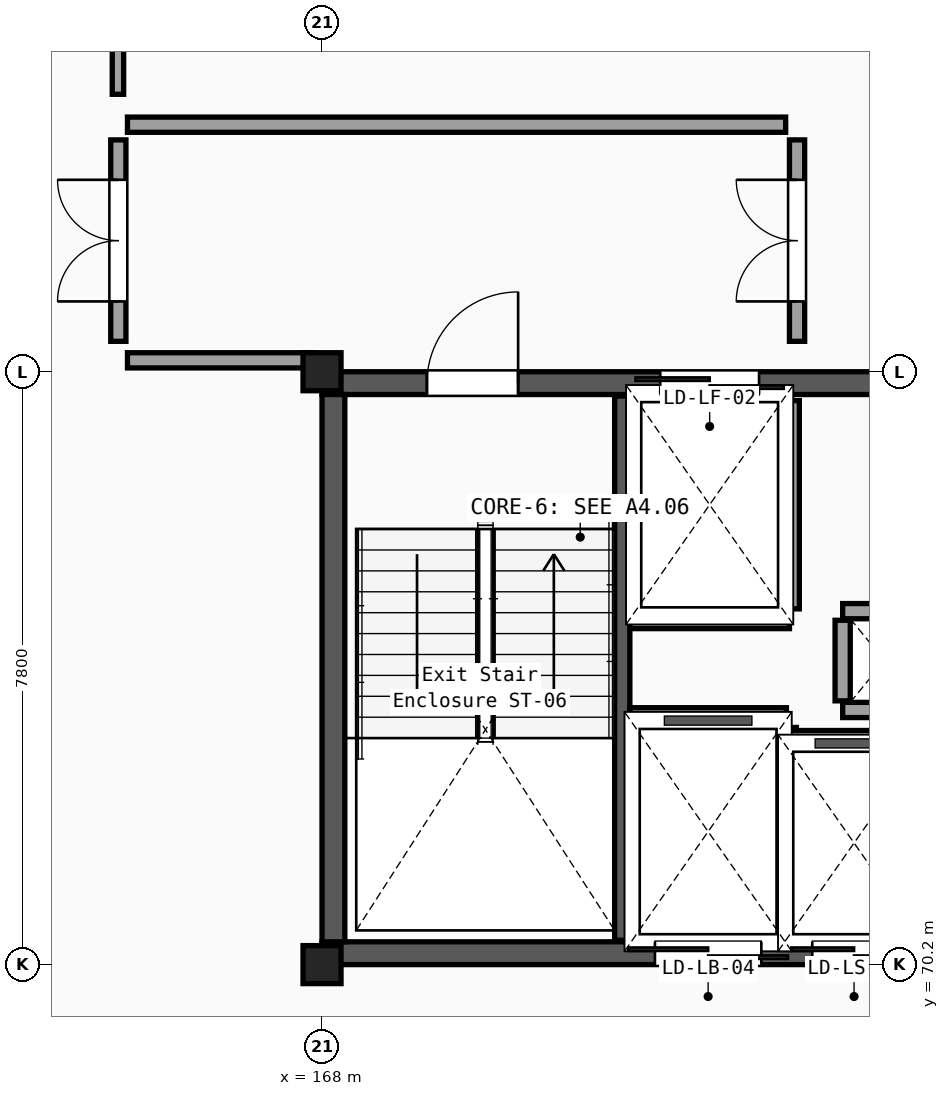
"""IFC4 building model, lengths in metres.
Left out: names, types, materials, properties, quantities, classifications, styles, units other than length and angle.
Written with IfcOpenShell. Run it as: python <this file> out.ifc"""

import sys

from ifc_helpers import new_model, si_unit, direction, frame, frame_2d, origin, origin_2d, place, context, subcontext, project, spatial, rectangle, i_section, extrude, element, fill, save


model = new_model("IFC4")
c1 = context("Model", 3, precision=1e-05, world=origin(), true_north=direction((0.0, 1.0)))
c2 = subcontext(c1, "Body", "Model", "MODEL_VIEW")
j1 = project(units=[si_unit("LENGTHUNIT", "METRE"), si_unit("PLANEANGLEUNIT", "RADIAN")], contexts=[c1])
p1 = place(None, origin())
s1 = spatial("IfcSite", under=j1, at=p1, CompositionType="ELEMENT")
p2 = place(p1, origin())
s2 = spatial("IfcBuilding", under=s1, at=p2, CompositionType="ELEMENT")
p3 = place(p2, frame((0.0, 0.0, 18.9)))
s3 = spatial("IfcBuildingStorey", under=s2, at=p3, CompositionType="ELEMENT", Elevation=18.9)
for number, where, z_axis, x_axis in (
    (1, (168.0, 70.2, 0.0), (0.0, 0.0, 1.0), (1.0, 0.0, 0.0)),
    (2, (168.0, 78.0, 0.0), (0.0, 0.0, 1.0), (1.0, 0.0, 0.0)),
):
    element("IfcColumn", number, at=place(p3, frame(where, z_axis=z_axis, x_axis=x_axis)), inside=s3, PredefinedType="COLUMN", context=c2, shape_type="SweptSolid", body=[
        extrude(i_section(OverallWidth=0.3, OverallDepth=0.5, WebThickness=0.014, FlangeThickness=0.028, FilletRadius=0.027, at=origin_2d()), origin(), (0.0, 0.0, 1.0), 4.05),
    ])
p4 = place(p3, frame((168.0, 70.35, 0.0), z_axis=(0.0, 0.0, 1.0), x_axis=(1.0, 0.0, 0.0)))
e3 = element("IfcWall", 3, at=p4, inside=s3, PredefinedType="SHEAR", context=c2, shape_type="SweptSolid", body=[
    extrude(rectangle(XDim=8.4, YDim=0.3, at=frame_2d((4.2, 0.0))), origin(), (0.0, 0.0, 1.0), 3.82),
])
p5 = place(p4, frame((4.38, 0.0, 0.0)))
e4 = element("IfcOpeningElement", 4, at=p5, cuts=e3, PredefinedType="OPENING", context=c2, shape_type="SweptSolid", body=[
    extrude(rectangle(XDim=1.4, YDim=2.2, at=frame_2d((0.7, 1.1))), frame((0.0, 0.16, 0.0), z_axis=(0.0, -1.0, 0.0), x_axis=(1.0, 0.0, 0.0)), (0.0, 0.0, 1.0), 0.32),
])
p6 = place(p4, frame((6.45, 0.0, 0.0)))
e5 = element("IfcOpeningElement", 5, at=p6, cuts=e3, PredefinedType="OPENING", context=c2, shape_type="SweptSolid", body=[
    extrude(rectangle(XDim=1.1, YDim=2.15, at=frame_2d((0.55, 1.075))), frame((0.0, 0.16, 0.0), z_axis=(0.0, -1.0, 0.0), x_axis=(1.0, 0.0, 0.0)), (0.0, 0.0, 1.0), 0.32),
])
p7 = place(p3, frame((168.0, 77.85, 0.0), z_axis=(0.0, 0.0, 1.0), x_axis=(1.0, 0.0, 0.0)))
e6 = element("IfcWall", 6, at=p7, inside=s3, PredefinedType="SHEAR", context=c2, shape_type="SweptSolid", body=[
    extrude(rectangle(XDim=8.4, YDim=0.3, at=frame_2d((4.2, 0.0))), origin(), (0.0, 0.0, 1.0), 3.82),
])
p8 = place(p7, frame((1.38, 0.0, 0.0)))
e7 = element("IfcOpeningElement", 7, at=p8, cuts=e6, PredefinedType="OPENING", context=c2, shape_type="SweptSolid", body=[
    extrude(rectangle(XDim=1.2, YDim=2.15, at=frame_2d((0.6, 1.075))), frame((0.0, 0.16, 0.0), z_axis=(0.0, -1.0, 0.0), x_axis=(1.0, 0.0, 0.0)), (0.0, 0.0, 1.0), 0.32),
])
p9 = place(p7, frame((4.45, 0.0, 0.0)))
e8 = element("IfcOpeningElement", 8, at=p9, cuts=e6, PredefinedType="OPENING", context=c2, shape_type="SweptSolid", body=[
    extrude(rectangle(XDim=1.3, YDim=2.2, at=frame_2d((0.65, 1.1))), frame((0.0, 0.16, 0.0), z_axis=(0.0, -1.0, 0.0), x_axis=(1.0, 0.0, 0.0)), (0.0, 0.0, 1.0), 0.32),
])
p10 = place(p3, frame((168.15, 70.5, 0.0), z_axis=(0.0, 0.0, 1.0), x_axis=(0.0, 1.0, 0.0)))
e9 = element("IfcWall", 9, at=p10, inside=s3, PredefinedType="SHEAR", context=c2, shape_type="SweptSolid", body=[
    extrude(rectangle(XDim=7.2, YDim=0.3, at=frame_2d((3.6, 0.0))), origin(), (0.0, 0.0, 1.0), 3.82),
])
p11 = place(p3, frame((171.95, 70.52, 0.0), z_axis=(0.0, 0.0, 1.0), x_axis=(0.0, 1.0, 0.0)))
e10 = element("IfcWall", 10, at=p11, inside=s3, PredefinedType="SHEAR", context=c2, shape_type="SweptSolid", body=[
    extrude(rectangle(XDim=7.16, YDim=0.2, at=frame_2d((3.58, 0.0))), origin(), (0.0, 0.0, 1.0), 3.82),
])
for number, where, z_axis, x_axis in (
    (11, (174.85, 73.55, 0.0), (0.0, 0.0, 1.0), (1.0, 0.0, 0.0)),
    (12, (174.85, 74.85, 0.0), (0.0, 0.0, 1.0), (1.0, 0.0, 0.0)),
):
    element("IfcWall", number, at=place(p3, frame(where, z_axis=z_axis, x_axis=x_axis)), inside=s3, PredefinedType="PARTITIONING", context=c2, shape_type="SweptSolid", body=[
        extrude(rectangle(XDim=1.1, YDim=0.2, at=frame_2d((0.55, 0.0))), origin(), (0.0, 0.0, 1.0), 3.25),
    ])
p12 = place(p3, frame((174.85, 73.67, 0.0), z_axis=(0.0, 0.0, 1.0), x_axis=(0.0, 1.0, 0.0)))
e13 = element("IfcWall", 13, at=p12, inside=s3, PredefinedType="PARTITIONING", context=c2, shape_type="SweptSolid", body=[
    extrude(rectangle(XDim=1.06, YDim=0.2, at=frame_2d((0.53, 0.0))), origin(), (0.0, 0.0, 1.0), 3.25),
])
p13 = place(p3, frame((174.18, 74.88, 0.0), z_axis=(0.0, 0.0, 1.0), x_axis=(0.0, 1.0, 0.0)))
e14 = element("IfcWall", 14, at=p13, inside=s3, PredefinedType="PARTITIONING", context=c2, shape_type="SweptSolid", body=[
    extrude(rectangle(XDim=2.74, YDim=0.2, at=frame_2d((1.37, 0.0))), origin(), (0.0, 0.0, 1.0), 3.25),
])
p14 = place(p3, frame((172.05, 74.72, 0.0), z_axis=(0.0, 0.0, 1.0), x_axis=(1.0, 0.0, 0.0)))
e15 = element("IfcWall", 15, at=p14, inside=s3, PredefinedType="PARTITIONING", context=c2, shape_type="SweptSolid", body=[
    extrude(rectangle(XDim=2.1, YDim=0.2, at=frame_2d((1.05, 0.0))), origin(), (0.0, 0.0, 1.0), 3.25),
])
p15 = place(p3, frame((174.14, 70.58, 0.0), z_axis=(0.0, 0.0, 1.0), x_axis=(0.0, 1.0, 0.0)))
e16 = element("IfcWall", 16, at=p15, inside=s3, PredefinedType="PARTITIONING", context=c2, shape_type="SweptSolid", body=[
    extrude(rectangle(XDim=2.74, YDim=0.2, at=frame_2d((1.37, 0.0))), origin(), (0.0, 0.0, 1.0), 3.25),
])
p16 = place(p3, frame((172.05, 73.48, 0.0), z_axis=(0.0, 0.0, 1.0), x_axis=(1.0, 0.0, 0.0)))
e17 = element("IfcWall", 17, at=p16, inside=s3, PredefinedType="PARTITIONING", context=c2, shape_type="SweptSolid", body=[
    extrude(rectangle(XDim=2.06, YDim=0.2, at=frame_2d((1.03, 0.0))), origin(), (0.0, 0.0, 1.0), 3.25),
])
p17 = place(p3, frame((174.07, 73.18, 0.0), z_axis=(0.0, 0.0, 1.0), x_axis=(1.0, 0.0, 0.0)))
e18 = element("IfcWall", 18, at=p17, inside=s3, PredefinedType="PARTITIONING", context=c2, shape_type="SweptSolid", body=[
    extrude(rectangle(XDim=1.86, YDim=0.2, at=frame_2d((0.93, 0.0))), origin(), (0.0, 0.0, 1.0), 3.25),
])
p18 = place(p3, frame((165.44, 78.15, 0.0), z_axis=(0.0, 0.0, 1.0), x_axis=(1.0, 0.0, 0.0)))
e19 = element("IfcWall", 19, at=p18, inside=s3, PredefinedType="PARTITIONING", context=c2, shape_type="SweptSolid", body=[
    extrude(rectangle(XDim=2.44, YDim=0.2, at=frame_2d((1.22, 0.0))), origin(), (0.0, 0.0, 1.0), 3.25),
])
p19 = place(p3, frame((165.44, 81.25, 0.0), z_axis=(0.0, 0.0, 1.0), x_axis=(1.0, 0.0, 0.0)))
e20 = element("IfcWall", 20, at=p19, inside=s3, PredefinedType="PARTITIONING", context=c2, shape_type="SweptSolid", body=[
    extrude(rectangle(XDim=8.66, YDim=0.2, at=frame_2d((4.33, 0.0))), origin(), (0.0, 0.0, 1.0), 3.25),
])
p20 = place(p3, frame((165.32, 78.4, 0.0), z_axis=(0.0, 0.0, 1.0), x_axis=(0.0, 1.0, 0.0)))
e21 = element("IfcWall", 21, at=p20, inside=s3, PredefinedType="PARTITIONING", context=c2, shape_type="SweptSolid", body=[
    extrude(rectangle(XDim=2.65, YDim=0.2, at=frame_2d((1.325, 0.0))), origin(), (0.0, 0.0, 1.0), 3.25),
])
p21 = place(p20, frame((0.525, 0.0, 0.0)))
e22 = element("IfcOpeningElement", 22, at=p21, cuts=e21, PredefinedType="OPENING", context=c2, shape_type="SweptSolid", body=[
    extrude(rectangle(XDim=1.6, YDim=2.2, at=frame_2d((0.8, 1.1))), frame((0.0, 0.11, 0.0), z_axis=(0.0, -1.0, 0.0), x_axis=(1.0, 0.0, 0.0)), (0.0, 0.0, 1.0), 0.22),
])
p22 = place(p3, frame((174.25, 78.4, 0.0), z_axis=(0.0, 0.0, 1.0), x_axis=(0.0, 1.0, 0.0)))
e23 = element("IfcWall", 23, at=p22, inside=s3, PredefinedType="PARTITIONING", context=c2, shape_type="SweptSolid", body=[
    extrude(rectangle(XDim=2.65, YDim=0.2, at=frame_2d((1.325, 0.0))), origin(), (0.0, 0.0, 1.0), 3.25),
])
p23 = place(p22, frame((0.525, 0.0, 0.0)))
e24 = element("IfcOpeningElement", 24, at=p23, cuts=e23, PredefinedType="OPENING", context=c2, shape_type="SweptSolid", body=[
    extrude(rectangle(XDim=1.6, YDim=2.2, at=frame_2d((0.8, 1.1))), frame((0.0, 0.11, 0.0), z_axis=(0.0, -1.0, 0.0), x_axis=(1.0, 0.0, 0.0)), (0.0, 0.0, 1.0), 0.22),
])
p24 = place(p3, frame((165.315, 81.65, 0.0), z_axis=(0.0, 0.0, 1.0), x_axis=(0.0, 1.0, 0.0)))
e25 = element("IfcWall", 25, at=p24, inside=s3, PredefinedType="PARTITIONING", context=c2, shape_type="SweptSolid", body=[
    extrude(rectangle(XDim=10.433, YDim=0.15, at=frame_2d((5.216, 0.0))), origin(), (0.0, 0.0, 1.0), 3.52),
])
p25 = place(p24, frame((4.691, 0.0, 0.0)))
e26 = element("IfcOpeningElement", 26, at=p25, cuts=e25, PredefinedType="OPENING", context=c2, shape_type="SweptSolid", body=[
    extrude(rectangle(XDim=1.05, YDim=2.15, at=frame_2d((0.525, 1.075))), frame((0.0, 0.085, 0.0), z_axis=(0.0, -1.0, 0.0), x_axis=(1.0, 0.0, 0.0)), (0.0, 0.0, 1.0), 0.17),
])
p26 = place(p8, origin())
e27 = element("IfcDoor", 27, at=p26, inside=s3, OperationType="SINGLE_SWING_RIGHT", PredefinedType="DOOR", context=c2, shape_type="SweptSolid", body=[
    extrude(rectangle(XDim=1.2, YDim=2.15, at=frame_2d((0.6, 1.075))), frame((0.0, 0.025, 0.0), z_axis=(0.0, -1.0, 0.0), x_axis=(1.0, 0.0, 0.0)), (0.0, 0.0, 1.0), 0.05),
])
fill(e7, e27)
p27 = place(p9, origin())
e28 = element("IfcDoor", 28, at=p27, inside=s3, OperationType="DOUBLE_DOOR_SLIDING", PredefinedType="DOOR", context=c2, shape_type="SweptSolid", body=[
    extrude(rectangle(XDim=1.3, YDim=2.2, at=frame_2d((0.65, 1.1))), frame((0.0, 0.025, 0.0), z_axis=(0.0, -1.0, 0.0), x_axis=(1.0, 0.0, 0.0)), (0.0, 0.0, 1.0), 0.05),
])
fill(e8, e28)
p28 = place(p5, origin())
e29 = element("IfcDoor", 29, at=p28, inside=s3, OperationType="DOUBLE_DOOR_SLIDING", PredefinedType="DOOR", context=c2, shape_type="SweptSolid", body=[
    extrude(rectangle(XDim=1.4, YDim=2.2, at=frame_2d((0.7, 1.1))), frame((0.0, 0.025, 0.0), z_axis=(0.0, -1.0, 0.0), x_axis=(1.0, 0.0, 0.0)), (0.0, 0.0, 1.0), 0.05),
])
fill(e4, e29)
p29 = place(p6, origin())
e30 = element("IfcDoor", 30, at=p29, inside=s3, OperationType="DOUBLE_DOOR_SLIDING", PredefinedType="DOOR", context=c2, shape_type="SweptSolid", body=[
    extrude(rectangle(XDim=1.1, YDim=2.15, at=frame_2d((0.55, 1.075))), frame((0.0, 0.025, 0.0), z_axis=(0.0, -1.0, 0.0), x_axis=(1.0, 0.0, 0.0)), (0.0, 0.0, 1.0), 0.05),
])
fill(e5, e30)
p30 = place(p21, origin())
e31 = element("IfcDoor", 31, at=p30, inside=s3, OperationType="DOUBLE_DOOR_SINGLE_SWING", PredefinedType="DOOR", context=c2, shape_type="SweptSolid", body=[
    extrude(rectangle(XDim=1.6, YDim=2.2, at=frame_2d((0.8, 1.1))), frame((0.0, 0.025, 0.0), z_axis=(0.0, -1.0, 0.0), x_axis=(1.0, 0.0, 0.0)), (0.0, 0.0, 1.0), 0.05),
])
fill(e22, e31)
p31 = place(p23, origin())
e32 = element("IfcDoor", 32, at=p31, inside=s3, OperationType="DOUBLE_DOOR_SINGLE_SWING", PredefinedType="DOOR", context=c2, shape_type="SweptSolid", body=[
    extrude(rectangle(XDim=1.6, YDim=2.2, at=frame_2d((0.8, 1.1))), frame((0.0, 0.025, 0.0), z_axis=(0.0, -1.0, 0.0), x_axis=(1.0, 0.0, 0.0)), (0.0, 0.0, 1.0), 0.05),
])
fill(e24, e32)
save(model, sys.argv[1])
